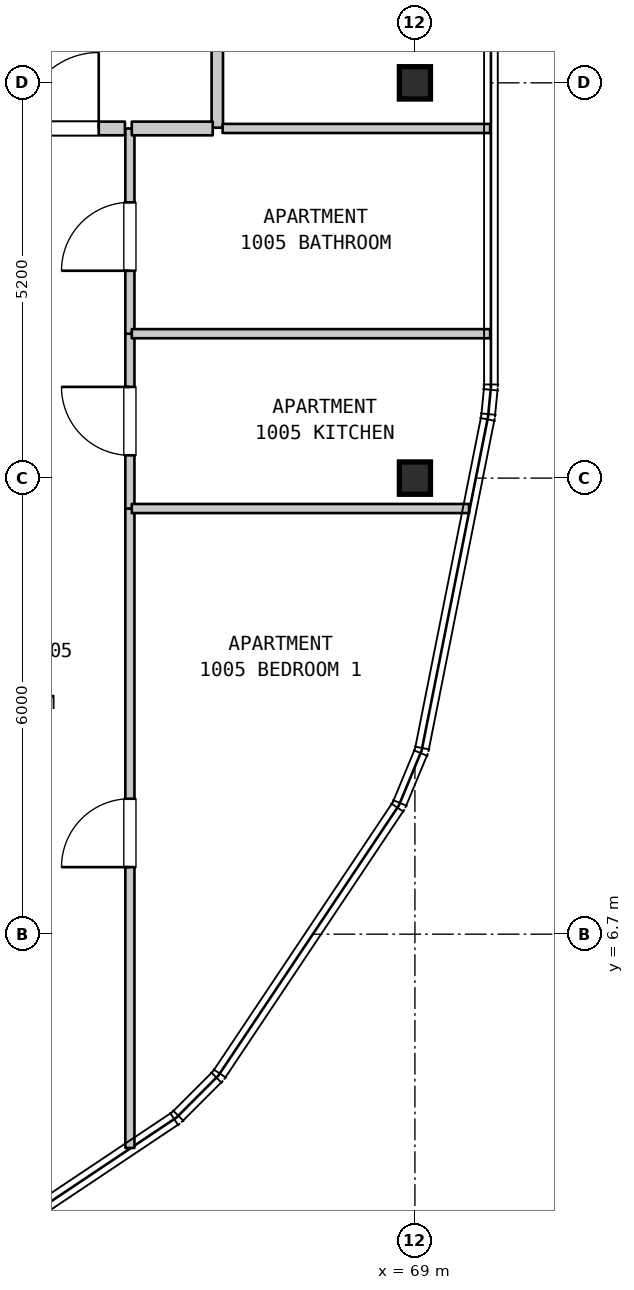
"""IFC4 building model, lengths in metres.
Left out: names, types, materials, properties, quantities, classifications, styles, units other than length and angle.
Written with IfcOpenShell. Run it as: python <this file> out.ifc"""

import sys

from ifc_helpers import new_model, si_unit, direction, frame, frame_2d, origin, origin_2d, place, context, subcontext, project, spatial, rectangle, i_section, extrude, element, fill, save


model = new_model("IFC4")
c1 = context("Model", 3, precision=1e-05, world=origin(), true_north=direction((0.0, 1.0)))
c2 = subcontext(c1, "Body", "Model", "MODEL_VIEW")
j1 = project(units=[si_unit("LENGTHUNIT", "METRE"), si_unit("PLANEANGLEUNIT", "RADIAN")], contexts=[c1])
p1 = place(None, origin())
s1 = spatial("IfcSite", under=j1, at=p1, CompositionType="ELEMENT")
p2 = place(p1, origin())
s2 = spatial("IfcBuilding", under=s1, at=p2, CompositionType="ELEMENT")
p3 = place(p2, frame((0.0, 0.0, 46.2)))
s3 = spatial("IfcBuildingStorey", under=s2, at=p3, CompositionType="ELEMENT", Elevation=46.2)
for number, where, z_axis, x_axis in (
    (1, (69.0, 12.7, 0.0), (0.0, 0.0, 1.0), (1.0, 0.0, 0.0)),
    (2, (69.0, 17.9, 0.0), (0.0, 0.0, 1.0), (1.0, 0.0, 0.0)),
):
    element("IfcColumn", number, at=place(p3, frame(where, z_axis=z_axis, x_axis=x_axis)), inside=s3, PredefinedType="COLUMN", context=c2, shape_type="SweptSolid", body=[
        extrude(i_section(OverallWidth=0.409, OverallDepth=0.425, WebThickness=0.032, FlangeThickness=0.052, FilletRadius=0.015, at=origin_2d()), origin(), (0.0, 0.0, 1.0), 3.7),
    ])
p4 = place(p3, frame((65.25, 3.888, 0.0), z_axis=(0.0, 0.0, 1.0), x_axis=(0.0, 1.0, 0.0)))
e3 = element("IfcWall", 3, at=p4, inside=s3, PredefinedType="PARTITIONING", context=c2, shape_type="SweptSolid", body=[
    extrude(rectangle(XDim=8.412, YDim=0.12, at=frame_2d((4.206, 0.0))), origin(), (0.0, 0.0, 1.0), 3.385),
])
p5 = place(p4, frame((3.694, 0.0, 0.0)))
e4 = element("IfcOpeningElement", 4, at=p5, cuts=e3, PredefinedType="OPENING", context=c2, shape_type="SweptSolid", body=[
    extrude(rectangle(XDim=0.9, YDim=2.15, at=frame_2d((0.45, 1.075))), frame((0.0, 0.07, 0.0), z_axis=(0.0, -1.0, 0.0), x_axis=(1.0, 0.0, 0.0)), (0.0, 0.0, 1.0), 0.14),
])
p6 = place(p3, frame((65.25, 12.3, 0.0), z_axis=(0.0, 0.0, 1.0), x_axis=(0.0, 1.0, 0.0)))
e5 = element("IfcWall", 5, at=p6, inside=s3, PredefinedType="PARTITIONING", context=c2, shape_type="SweptSolid", body=[
    extrude(rectangle(XDim=2.3, YDim=0.12, at=frame_2d((1.15, 0.0))), origin(), (0.0, 0.0, 1.0), 3.385),
])
p7 = place(p6, frame((0.7, 0.0, 0.0)))
e6 = element("IfcOpeningElement", 6, at=p7, cuts=e5, PredefinedType="OPENING", context=c2, shape_type="SweptSolid", body=[
    extrude(rectangle(XDim=0.9, YDim=2.15, at=frame_2d((0.45, 1.075))), frame((0.0, 0.07, 0.0), z_axis=(0.0, -1.0, 0.0), x_axis=(1.0, 0.0, 0.0)), (0.0, 0.0, 1.0), 0.14),
])
p8 = place(p3, frame((65.25, 14.6, 0.0), z_axis=(0.0, 0.0, 1.0), x_axis=(0.0, 1.0, 0.0)))
e7 = element("IfcWall", 7, at=p8, inside=s3, PredefinedType="PARTITIONING", context=c2, shape_type="SweptSolid", body=[
    extrude(rectangle(XDim=2.7, YDim=0.12, at=frame_2d((1.35, 0.0))), origin(), (0.0, 0.0, 1.0), 3.385),
])
p9 = place(p8, frame((0.828, 0.0, 0.0)))
e8 = element("IfcOpeningElement", 8, at=p9, cuts=e7, PredefinedType="OPENING", context=c2, shape_type="SweptSolid", body=[
    extrude(rectangle(XDim=0.9, YDim=2.1, at=frame_2d((0.45, 1.05))), frame((0.0, 0.07, 0.0), z_axis=(0.0, -1.0, 0.0), x_axis=(1.0, 0.0, 0.0)), (0.0, 0.0, 1.0), 0.14),
])
p10 = place(p3, frame((66.4, 17.31, 0.0), z_axis=(0.0, 0.0, 1.0), x_axis=(0.0, 1.0, 0.0)))
e9 = element("IfcWall", 9, at=p10, inside=s3, PredefinedType="STANDARD", context=c2, shape_type="SweptSolid", body=[
    extrude(rectangle(XDim=2.34, YDim=0.15, at=frame_2d((1.17, 0.0))), origin(), (0.0, 0.0, 1.0), 3.385),
])
p11 = place(p3, frame((65.275, 12.3, 0.0), z_axis=(0.0, 0.0, 1.0), x_axis=(1.0, 0.0, 0.0)))
e10 = element("IfcWall", 10, at=p11, inside=s3, PredefinedType="PARTITIONING", context=c2, shape_type="SweptSolid", body=[
    extrude(rectangle(XDim=4.437, YDim=0.12, at=frame_2d((2.219, 0.0))), origin(), (0.0, 0.0, 1.0), 3.385),
])
p12 = place(p3, frame((65.275, 14.6, 0.0), z_axis=(0.0, 0.0, 1.0), x_axis=(1.0, 0.0, 0.0)))
e11 = element("IfcWall", 11, at=p12, inside=s3, PredefinedType="PARTITIONING", context=c2, shape_type="SweptSolid", body=[
    extrude(rectangle(XDim=4.715, YDim=0.12, at=frame_2d((2.357, 0.0))), origin(), (0.0, 0.0, 1.0), 3.385),
])
p13 = place(p3, frame((61.675, 17.3, 0.0), z_axis=(0.0, 0.0, 1.0), x_axis=(1.0, 0.0, 0.0)))
e12 = element("IfcWall", 12, at=p13, inside=s3, PredefinedType="STANDARD", context=c2, shape_type="SweptSolid", body=[
    extrude(rectangle(XDim=3.51, YDim=0.18, at=frame_2d((1.755, 0.0))), origin(), (0.0, 0.0, 1.0), 3.385),
])
p14 = place(p13, frame((2.165, 0.0, 0.0)))
e13 = element("IfcOpeningElement", 13, at=p14, cuts=e12, PredefinedType="OPENING", context=c2, shape_type="SweptSolid", body=[
    extrude(rectangle(XDim=1.0, YDim=2.15, at=frame_2d((0.5, 1.075))), frame((0.0, 0.1, 0.0), z_axis=(0.0, -1.0, 0.0), x_axis=(1.0, 0.0, 0.0)), (0.0, 0.0, 1.0), 0.2),
])
p15 = place(p3, frame((65.275, 17.3, 0.0), z_axis=(0.0, 0.0, 1.0), x_axis=(1.0, 0.0, 0.0)))
e14 = element("IfcWall", 14, at=p15, inside=s3, PredefinedType="STANDARD", context=c2, shape_type="SweptSolid", body=[
    extrude(rectangle(XDim=1.065, YDim=0.18, at=frame_2d((0.533, 0.0))), origin(), (0.0, 0.0, 1.0), 3.385),
])
p16 = place(p3, frame((66.47, 17.3, 0.0), z_axis=(0.0, 0.0, 1.0), x_axis=(1.0, 0.0, 0.0)))
e15 = element("IfcWall", 15, at=p16, inside=s3, PredefinedType="PARTITIONING", context=c2, shape_type="SweptSolid", body=[
    extrude(rectangle(XDim=3.52, YDim=0.12, at=frame_2d((1.76, 0.0))), origin(), (0.0, 0.0, 1.0), 3.385),
])
p17 = place(p5, origin())
e16 = element("IfcDoor", 16, at=p17, inside=s3, OperationType="SINGLE_SWING_LEFT", PredefinedType="DOOR", context=c2, shape_type="SweptSolid", body=[
    extrude(rectangle(XDim=0.9, YDim=2.15, at=frame_2d((0.45, 1.075))), frame((0.0, 0.025, 0.0), z_axis=(0.0, -1.0, 0.0), x_axis=(1.0, 0.0, 0.0)), (0.0, 0.0, 1.0), 0.05),
])
fill(e4, e16)
p18 = place(p7, origin())
e17 = element("IfcDoor", 17, at=p18, inside=s3, OperationType="SINGLE_SWING_RIGHT", PredefinedType="DOOR", context=c2, shape_type="SweptSolid", body=[
    extrude(rectangle(XDim=0.9, YDim=2.15, at=frame_2d((0.45, 1.075))), frame((0.0, 0.025, 0.0), z_axis=(0.0, -1.0, 0.0), x_axis=(1.0, 0.0, 0.0)), (0.0, 0.0, 1.0), 0.05),
])
fill(e6, e17)
p19 = place(p9, origin())
e18 = element("IfcDoor", 18, at=p19, inside=s3, OperationType="SINGLE_SWING_LEFT", PredefinedType="DOOR", context=c2, shape_type="SweptSolid", body=[
    extrude(rectangle(XDim=0.9, YDim=2.1, at=frame_2d((0.45, 1.05))), frame((0.0, 0.025, 0.0), z_axis=(0.0, -1.0, 0.0), x_axis=(1.0, 0.0, 0.0)), (0.0, 0.0, 1.0), 0.05),
])
fill(e8, e18)
p20 = place(p14, origin())
e19 = element("IfcDoor", 19, at=p20, inside=s3, OperationType="SINGLE_SWING_RIGHT", PredefinedType="DOOR", context=c2, shape_type="SweptSolid", body=[
    extrude(rectangle(XDim=1.0, YDim=2.15, at=frame_2d((0.5, 1.075))), frame((0.0, 0.025, 0.0), z_axis=(0.0, -1.0, 0.0), x_axis=(1.0, 0.0, 0.0)), (0.0, 0.0, 1.0), 0.05),
])
fill(e13, e19)
save(model, sys.argv[1])
